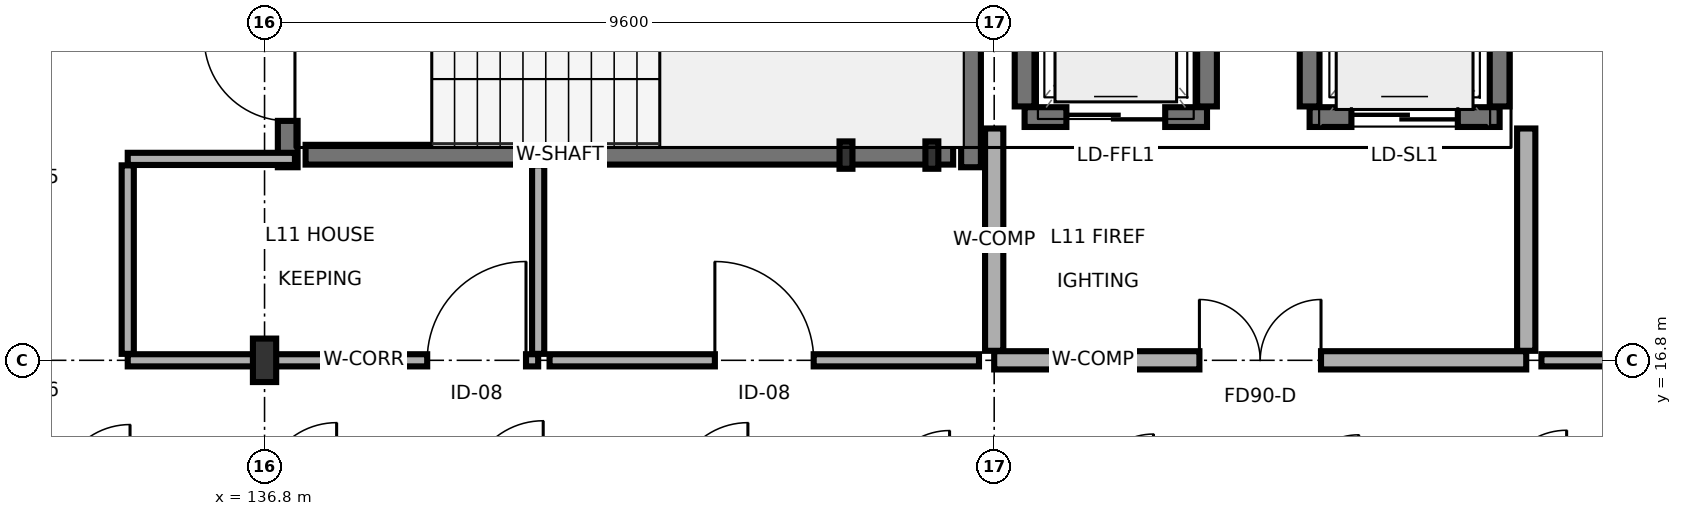
"""IFC4 building model, lengths in metres.
Left out: names, types, materials, properties, quantities, classifications, styles, units other than length and angle.
Written with IfcOpenShell. Run it as: python <this file> out.ifc"""

import sys

from ifc_helpers import new_model, si_unit, direction, frame, frame_2d, origin, origin_2d, place, context, subcontext, project, spatial, rectangle, i_section, extrude, element, fill, save


model = new_model("IFC4")
c1 = context("Model", 3, precision=1e-05, world=origin(), true_north=direction((0.0, 1.0)))
c2 = subcontext(c1, "Body", "Model", "MODEL_VIEW")
j1 = project(units=[si_unit("LENGTHUNIT", "METRE"), si_unit("PLANEANGLEUNIT", "RADIAN")], contexts=[c1])
p1 = place(None, origin())
s1 = spatial("IfcSite", under=j1, at=p1, CompositionType="ELEMENT")
p2 = place(p1, origin())
s2 = spatial("IfcBuilding", under=s1, at=p2, CompositionType="ELEMENT")
p3 = place(p2, frame((0.0, 0.0, 38.5)))
s3 = spatial("IfcBuildingStorey", under=s2, at=p3, CompositionType="ELEMENT", Elevation=38.5)
p4 = place(p3, frame((136.8, 16.8, 0.0), z_axis=(0.0, 0.0, 1.0), x_axis=(1.0, 0.0, 0.0)))
e1 = element("IfcColumn", 1, at=p4, inside=s3, PredefinedType="COLUMN", context=c2, shape_type="SweptSolid", body=[
    extrude(i_section(OverallWidth=0.306, OverallDepth=0.572, WebThickness=0.021, FlangeThickness=0.04, FilletRadius=0.027, at=origin_2d()), origin(), (0.0, 0.0, 1.0), 3.4),
])
for number, where, z_axis, x_axis in (
    (2, (144.45, 19.5, 0.0), (0.0, 0.0, 1.0), (1.0, 0.0, 0.0)),
    (3, (145.58, 19.5, 0.0), (0.0, 0.0, 1.0), (1.0, 0.0, 0.0)),
):
    element("IfcColumn", number, at=place(p3, frame(where, z_axis=z_axis, x_axis=x_axis)), inside=s3, PredefinedType="PILASTER", context=c2, shape_type="SweptSolid", body=[
        extrude(i_section(OverallWidth=0.17, OverallDepth=0.36, WebThickness=0.008, FlangeThickness=0.013, FilletRadius=0.018, at=origin_2d()), origin(), (0.0, 0.0, 1.0), 3.4),
    ])
p5 = place(p3, frame((137.105, 19.34, 0.0), z_axis=(0.0, 0.0, 1.0), x_axis=(0.0, 1.0, 0.0)))
e4 = element("IfcWall", 4, at=p5, inside=s3, PredefinedType="SHEAR", context=c2, shape_type="SweptSolid", body=[
    extrude(rectangle(XDim=4.27, YDim=0.26, at=frame_2d((2.135, 0.0))), origin(), (0.0, 0.0, 1.0), 3.15),
])
p6 = place(p5, frame((0.61, 0.0, 0.0)))
e5 = element("IfcOpeningElement", 5, at=p6, cuts=e4, PredefinedType="OPENING", context=c2, shape_type="SweptSolid", body=[
    extrude(rectangle(XDim=1.1, YDim=2.2, at=frame_2d((0.55, 1.1))), frame((0.0, 0.14, 0.0), z_axis=(0.0, -1.0, 0.0), x_axis=(1.0, 0.0, 0.0)), (0.0, 0.0, 1.0), 0.28),
])
p7 = place(p3, frame((146.095, 19.34, 0.0), z_axis=(0.0, 0.0, 1.0), x_axis=(0.0, 1.0, 0.0)))
e6 = element("IfcWall", 6, at=p7, inside=s3, PredefinedType="SHEAR", context=c2, shape_type="SweptSolid", body=[
    extrude(rectangle(XDim=4.27, YDim=0.26, at=frame_2d((2.135, 0.0))), origin(), (0.0, 0.0, 1.0), 3.15),
])
p8 = place(p3, frame((137.34, 19.505, 0.0), z_axis=(0.0, 0.0, 1.0), x_axis=(1.0, 0.0, 0.0)))
e7 = element("IfcWall", 7, at=p8, inside=s3, PredefinedType="SHEAR", context=c2, shape_type="SweptSolid", body=[
    extrude(rectangle(XDim=8.52, YDim=0.26, at=frame_2d((4.26, 0.0))), origin(), (0.0, 0.0, 1.0), 3.15),
])
p9 = place(p3, frame((146.8, 20.0, 0.0), z_axis=(0.0, 0.0, 1.0), x_axis=(1.0, 0.0, 0.0)))
e8 = element("IfcWall", 8, at=p9, inside=s3, PredefinedType="SHEAR", context=c2, shape_type="SweptSolid", body=[
    extrude(rectangle(XDim=2.4, YDim=0.26, at=frame_2d((1.2, 0.0))), origin(), (0.0, 0.0, 1.0), 3.15),
])
p10 = place(p9, frame((0.55, 0.0, 0.0)))
e9 = element("IfcOpeningElement", 9, at=p10, cuts=e8, PredefinedType="OPENING", context=c2, shape_type="SweptSolid", body=[
    extrude(rectangle(XDim=1.3, YDim=2.25, at=frame_2d((0.65, 1.125))), frame((0.0, 0.14, 0.0), z_axis=(0.0, -1.0, 0.0), x_axis=(1.0, 0.0, 0.0)), (0.0, 0.0, 1.0), 0.28),
])
for number, where, z_axis, x_axis in (
    (10, (146.8, 20.14, 0.0), (0.0, 0.0, 1.0), (0.0, 1.0, 0.0)),
    (11, (149.2, 20.14, 0.0), (0.0, 0.0, 1.0), (0.0, 1.0, 0.0)),
):
    element("IfcWall", number, at=place(p3, frame(where, z_axis=z_axis, x_axis=x_axis)), inside=s3, PredefinedType="SHEAR", context=c2, shape_type="SweptSolid", body=[
        extrude(rectangle(XDim=2.52, YDim=0.26, at=frame_2d((1.26, 0.0))), origin(), (0.0, 0.0, 1.0), 3.15),
    ])
p11 = place(p3, frame((150.55, 20.0, 0.0), z_axis=(0.0, 0.0, 1.0), x_axis=(1.0, 0.0, 0.0)))
e12 = element("IfcWall", 12, at=p11, inside=s3, PredefinedType="SHEAR", context=c2, shape_type="SweptSolid", body=[
    extrude(rectangle(XDim=2.5, YDim=0.26, at=frame_2d((1.25, 0.0))), origin(), (0.0, 0.0, 1.0), 3.15),
])
p12 = place(p11, frame((0.55, 0.0, 0.0)))
e13 = element("IfcOpeningElement", 13, at=p12, cuts=e12, PredefinedType="OPENING", context=c2, shape_type="SweptSolid", body=[
    extrude(rectangle(XDim=1.4, YDim=2.3, at=frame_2d((0.7, 1.15))), frame((0.0, 0.14, 0.0), z_axis=(0.0, -1.0, 0.0), x_axis=(1.0, 0.0, 0.0)), (0.0, 0.0, 1.0), 0.28),
])
for number, where, z_axis, x_axis in (
    (14, (150.55, 20.14, 0.0), (0.0, 0.0, 1.0), (0.0, 1.0, 0.0)),
    (15, (153.05, 20.14, 0.0), (0.0, 0.0, 1.0), (0.0, 1.0, 0.0)),
):
    element("IfcWall", number, at=place(p3, frame(where, z_axis=z_axis, x_axis=x_axis)), inside=s3, PredefinedType="SHEAR", context=c2, shape_type="SweptSolid", body=[
        extrude(rectangle(XDim=2.52, YDim=0.26, at=frame_2d((1.26, 0.0))), origin(), (0.0, 0.0, 1.0), 3.15),
    ])
p13 = place(p3, frame((146.4, 16.8, 0.0), z_axis=(0.0, 0.0, 1.0), x_axis=(1.0, 0.0, 0.0)))
e16 = element("IfcWall", 16, at=p13, inside=s3, PredefinedType="SOLIDWALL", context=c2, shape_type="SweptSolid", body=[
    extrude(rectangle(XDim=7.0, YDim=0.24, at=frame_2d((3.5, 0.0))), origin(), (0.0, 0.0, 1.0), 2.685),
])
p14 = place(p13, frame((2.7, 0.0, 0.0)))
e17 = element("IfcOpeningElement", 17, at=p14, cuts=e16, PredefinedType="OPENING", context=c2, shape_type="SweptSolid", body=[
    extrude(rectangle(XDim=1.6, YDim=2.2, at=frame_2d((0.8, 1.1))), frame((0.0, 0.13, 0.0), z_axis=(0.0, -1.0, 0.0), x_axis=(1.0, 0.0, 0.0)), (0.0, 0.0, 1.0), 0.26),
])
for number, where, z_axis, x_axis in (
    (18, (146.4, 16.925, 0.0), (0.0, 0.0, 1.0), (0.0, 1.0, 0.0)),
    (19, (153.4, 16.925, 0.0), (0.0, 0.0, 1.0), (0.0, 1.0, 0.0)),
):
    element("IfcWall", number, at=place(p3, frame(where, z_axis=z_axis, x_axis=x_axis)), inside=s3, PredefinedType="SOLIDWALL", context=c2, shape_type="SweptSolid", body=[
        extrude(rectangle(XDim=2.925, YDim=0.24, at=frame_2d((1.462, 0.0))), origin(), (0.0, 0.0, 1.0), 2.685),
    ])
p15 = place(p3, frame((135.0, 16.8, 0.0), z_axis=(0.0, 0.0, 1.0), x_axis=(1.0, 0.0, 0.0)))
e20 = element("IfcWall", 20, at=p15, inside=s3, PredefinedType="PARTITIONING", context=c2, shape_type="SweptSolid", body=[
    extrude(rectangle(XDim=5.4, YDim=0.16, at=frame_2d((2.7, 0.0))), origin(), (0.0, 0.0, 1.0), 2.685),
])
p16 = place(p15, frame((3.94, 0.0, 0.0)))
e21 = element("IfcOpeningElement", 21, at=p16, cuts=e20, PredefinedType="OPENING", context=c2, shape_type="SweptSolid", body=[
    extrude(rectangle(XDim=1.3, YDim=2.2, at=frame_2d((0.65, 1.1))), frame((0.0, 0.09, 0.0), z_axis=(0.0, -1.0, 0.0), x_axis=(1.0, 0.0, 0.0)), (0.0, 0.0, 1.0), 0.18),
])
p17 = place(p3, frame((135.0, 16.885, 0.0), z_axis=(0.0, 0.0, 1.0), x_axis=(0.0, 1.0, 0.0)))
e22 = element("IfcWall", 22, at=p17, inside=s3, PredefinedType="PARTITIONING", context=c2, shape_type="SweptSolid", body=[
    extrude(rectangle(XDim=2.48, YDim=0.16, at=frame_2d((1.24, 0.0))), origin(), (0.0, 0.0, 1.0), 2.735),
])
p18 = place(p3, frame((140.4, 16.885, 0.0), z_axis=(0.0, 0.0, 1.0), x_axis=(0.0, 1.0, 0.0)))
e23 = element("IfcWall", 23, at=p18, inside=s3, PredefinedType="PARTITIONING", context=c2, shape_type="SweptSolid", body=[
    extrude(rectangle(XDim=2.48, YDim=0.16, at=frame_2d((1.24, 0.0))), origin(), (0.0, 0.0, 1.0), 2.685),
])
p19 = place(p3, frame((135.0, 19.45, 0.0), z_axis=(0.0, 0.0, 1.0), x_axis=(1.0, 0.0, 0.0)))
e24 = element("IfcWall", 24, at=p19, inside=s3, PredefinedType="PARTITIONING", context=c2, shape_type="SweptSolid", body=[
    extrude(rectangle(XDim=2.2, YDim=0.16, at=frame_2d((1.1, 0.0))), origin(), (0.0, 0.0, 1.0), 2.685),
])
p20 = place(p3, frame((140.55, 16.8, 0.0), z_axis=(0.0, 0.0, 1.0), x_axis=(1.0, 0.0, 0.0)))
e25 = element("IfcWall", 25, at=p20, inside=s3, PredefinedType="PARTITIONING", context=c2, shape_type="SweptSolid", body=[
    extrude(rectangle(XDim=5.65, YDim=0.16, at=frame_2d((2.825, 0.0))), origin(), (0.0, 0.0, 1.0), 2.685),
])
p21 = place(p20, frame((2.175, 0.0, 0.0)))
e26 = element("IfcOpeningElement", 26, at=p21, cuts=e25, PredefinedType="OPENING", context=c2, shape_type="SweptSolid", body=[
    extrude(rectangle(XDim=1.3, YDim=2.2, at=frame_2d((0.65, 1.1))), frame((0.0, 0.09, 0.0), z_axis=(0.0, -1.0, 0.0), x_axis=(1.0, 0.0, 0.0)), (0.0, 0.0, 1.0), 0.18),
])
p22 = place(p3, frame((153.6, 16.8, 0.0), z_axis=(0.0, 0.0, 1.0), x_axis=(1.0, 0.0, 0.0)))
e27 = element("IfcWall", 27, at=p22, inside=s3, PredefinedType="PARTITIONING", context=c2, shape_type="SweptSolid", body=[
    extrude(rectangle(XDim=1.8, YDim=0.16, at=frame_2d((0.9, 0.0))), origin(), (0.0, 0.0, 1.0), 2.685),
])
p23 = place(p6, origin())
e28 = element("IfcDoor", 28, at=p23, inside=s3, OperationType="SINGLE_SWING_RIGHT", PredefinedType="DOOR", context=c2, shape_type="SweptSolid", body=[
    extrude(rectangle(XDim=1.1, YDim=2.2, at=frame_2d((0.55, 1.1))), frame((0.0, 0.025, 0.0), z_axis=(0.0, -1.0, 0.0), x_axis=(1.0, 0.0, 0.0)), (0.0, 0.0, 1.0), 0.05),
])
fill(e5, e28)
p24 = place(p10, origin())
e29 = element("IfcDoor", 29, at=p24, inside=s3, OperationType="SLIDING_TO_RIGHT", PredefinedType="DOOR", context=c2, shape_type="SweptSolid", body=[
    extrude(rectangle(XDim=1.3, YDim=2.25, at=frame_2d((0.65, 1.125))), frame((0.0, 0.025, 0.0), z_axis=(0.0, -1.0, 0.0), x_axis=(1.0, 0.0, 0.0)), (0.0, 0.0, 1.0), 0.05),
])
fill(e9, e29)
p25 = place(p12, origin())
e30 = element("IfcDoor", 30, at=p25, inside=s3, OperationType="SLIDING_TO_LEFT", PredefinedType="DOOR", context=c2, shape_type="SweptSolid", body=[
    extrude(rectangle(XDim=1.4, YDim=2.3, at=frame_2d((0.7, 1.15))), frame((0.0, 0.025, 0.0), z_axis=(0.0, -1.0, 0.0), x_axis=(1.0, 0.0, 0.0)), (0.0, 0.0, 1.0), 0.05),
])
fill(e13, e30)
p26 = place(p14, origin())
e31 = element("IfcDoor", 31, at=p26, inside=s3, OperationType="DOUBLE_DOOR_SINGLE_SWING", PredefinedType="DOOR", context=c2, shape_type="SweptSolid", body=[
    extrude(rectangle(XDim=1.6, YDim=2.2, at=frame_2d((0.8, 1.1))), frame((0.0, 0.025, 0.0), z_axis=(0.0, -1.0, 0.0), x_axis=(1.0, 0.0, 0.0)), (0.0, 0.0, 1.0), 0.05),
])
fill(e17, e31)
p27 = place(p16, origin())
e32 = element("IfcDoor", 32, at=p27, inside=s3, OperationType="SINGLE_SWING_RIGHT", PredefinedType="DOOR", context=c2, shape_type="SweptSolid", body=[
    extrude(rectangle(XDim=1.3, YDim=2.2, at=frame_2d((0.65, 1.1))), frame((0.0, 0.025, 0.0), z_axis=(0.0, -1.0, 0.0), x_axis=(1.0, 0.0, 0.0)), (0.0, 0.0, 1.0), 0.05),
])
fill(e21, e32)
p28 = place(p21, origin())
e33 = element("IfcDoor", 33, at=p28, inside=s3, OperationType="SINGLE_SWING_LEFT", PredefinedType="DOOR", context=c2, shape_type="SweptSolid", body=[
    extrude(rectangle(XDim=1.3, YDim=2.2, at=frame_2d((0.65, 1.1))), frame((0.0, 0.025, 0.0), z_axis=(0.0, -1.0, 0.0), x_axis=(1.0, 0.0, 0.0)), (0.0, 0.0, 1.0), 0.05),
])
fill(e26, e33)
save(model, sys.argv[1])
